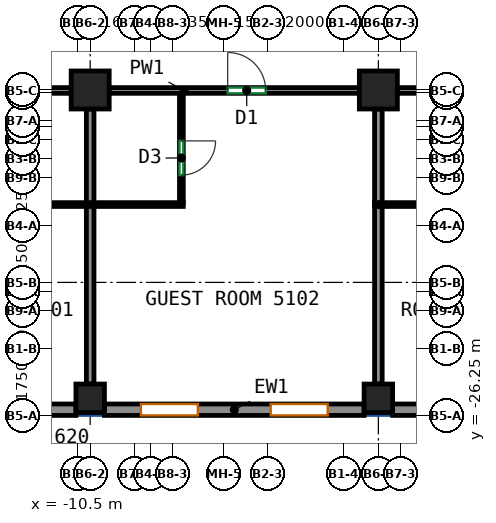
"""IFC4 building model, lengths in metres.
Left out: names, types, materials, properties, quantities, classifications, styles, units other than length and angle.
Written with IfcOpenShell. Run it as: python <this file> out.ifc"""

import sys

from ifc_helpers import new_model, si_unit, direction, frame, frame_2d, origin, origin_2d, place, context, subcontext, project, spatial, rectangle, extrude, source, transform, mapped, element, fill, save


model = new_model("IFC4")
c1 = context("Model", 3, precision=1e-05, world=origin(), true_north=direction((0.0, 1.0)))
c2 = subcontext(c1, "Body", "Model", "MODEL_VIEW")
j1 = project(units=[si_unit("LENGTHUNIT", "METRE"), si_unit("PLANEANGLEUNIT", "RADIAN")], contexts=[c1])
p1 = place(None, origin())
s1 = spatial("IfcSite", under=j1, at=p1, CompositionType="ELEMENT")
p2 = place(p1, origin())
s2 = spatial("IfcBuilding", under=s1, at=p2, CompositionType="ELEMENT")
p3 = place(p2, frame((0.0, 0.0, 210.1)))
s3 = spatial("IfcBuildingStorey", under=s2, at=p3, CompositionType="ELEMENT", Elevation=210.1)
m1 = source(origin(), c2, "Body", "SweptSolid", [
    extrude(rectangle(XDim=0.75, YDim=0.75, at=origin_2d()), origin(), (0.0, 0.0, 1.0), 3.12),
])
p4 = place(p3, frame((-10.167, -25.8, 0.0), z_axis=(0.0, 0.0, 1.0), x_axis=(1.0, 0.0, 0.0)))
e1 = element("IfcColumn", 1, at=p4, inside=s3, PredefinedType="COLUMN", context=c2, shape_type="MappedRepresentation", body=[
    mapped(m1, transform((0.0, 0.0, 0.0))),
])
m2 = source(origin(), c2, "Body", "SweptSolid", [
    extrude(rectangle(XDim=1.0, YDim=1.0, at=origin_2d()), origin(), (0.0, 0.0, 1.0), 3.12),
])
p5 = place(p3, frame((-10.167, -17.688, 0.0), z_axis=(0.0, 0.0, 1.0), x_axis=(1.0, 0.0, 0.0)))
e2 = element("IfcColumn", 2, at=p5, inside=s3, PredefinedType="COLUMN", context=c2, shape_type="MappedRepresentation", body=[
    mapped(m2, transform((0.0, 0.0, 0.0))),
])
p6 = place(p3, frame((-2.583, -25.8, 0.0), z_axis=(0.0, 0.0, 1.0), x_axis=(1.0, 0.0, 0.0)))
e3 = element("IfcColumn", 3, at=p6, inside=s3, PredefinedType="COLUMN", context=c2, shape_type="MappedRepresentation", body=[
    mapped(m1, transform((0.0, 0.0, 0.0))),
])
p7 = place(p3, frame((-2.583, -17.688, 0.0), z_axis=(0.0, 0.0, 1.0), x_axis=(1.0, 0.0, 0.0)))
e4 = element("IfcColumn", 4, at=p7, inside=s3, PredefinedType="COLUMN", context=c2, shape_type="MappedRepresentation", body=[
    mapped(m2, transform((0.0, 0.0, 0.0))),
])
m3 = source(origin(), c2, "Body", "SweptSolid", [
    extrude(rectangle(XDim=6.833, YDim=0.3, at=frame_2d((3.417, 0.0))), origin(), (0.0, 0.0, 1.0), 3.12),
])
p8 = place(p3, frame((-17.375, -26.1, 0.0), z_axis=(0.0, 0.0, 1.0), x_axis=(1.0, 0.0, 0.0)))
e5 = element("IfcWall", 5, at=p8, inside=s3, PredefinedType="SOLIDWALL", context=c2, shape_type="MappedRepresentation", body=[
    mapped(m3, transform((0.0, 0.0, 0.0))),
])
p9 = place(p8, frame((0.958, 0.0, 0.85)))
e6 = element("IfcOpeningElement", 6, at=p9, cuts=e5, PredefinedType="OPENING", context=c2, shape_type="SweptSolid", body=[
    extrude(rectangle(XDim=1.5, YDim=1.95, at=frame_2d((0.75, 0.975))), frame((0.0, 0.16, 0.0), z_axis=(0.0, -1.0, 0.0), x_axis=(1.0, 0.0, 0.0)), (0.0, 0.0, 1.0), 0.32),
])
p10 = place(p8, frame((4.375, 0.0, 0.85)))
e7 = element("IfcOpeningElement", 7, at=p10, cuts=e5, PredefinedType="OPENING", context=c2, shape_type="SweptSolid", body=[
    extrude(rectangle(XDim=1.5, YDim=1.95, at=frame_2d((0.75, 0.975))), frame((0.0, 0.16, 0.0), z_axis=(0.0, -1.0, 0.0), x_axis=(1.0, 0.0, 0.0)), (0.0, 0.0, 1.0), 0.32),
])
m4 = source(origin(), c2, "Body", "SweptSolid", [
    extrude(rectangle(XDim=6.833, YDim=0.3, at=frame_2d((3.417, 0.0))), origin(), (0.0, 0.0, 1.0), 3.12),
])
p11 = place(p3, frame((-9.792, -26.1, 0.0), z_axis=(0.0, 0.0, 1.0), x_axis=(1.0, 0.0, 0.0)))
e8 = element("IfcWall", 8, at=p11, inside=s3, PredefinedType="SOLIDWALL", context=c2, shape_type="MappedRepresentation", body=[
    mapped(m4, transform((0.0, 0.0, 0.0))),
])
p12 = place(p11, frame((0.958, 0.0, 0.85)))
e9 = element("IfcOpeningElement", 9, at=p12, cuts=e8, PredefinedType="OPENING", context=c2, shape_type="SweptSolid", body=[
    extrude(rectangle(XDim=1.5, YDim=1.95, at=frame_2d((0.75, 0.975))), frame((0.0, 0.16, 0.0), z_axis=(0.0, -1.0, 0.0), x_axis=(1.0, 0.0, 0.0)), (0.0, 0.0, 1.0), 0.32),
])
p13 = place(p11, frame((4.375, 0.0, 0.85)))
e10 = element("IfcOpeningElement", 10, at=p13, cuts=e8, PredefinedType="OPENING", context=c2, shape_type="SweptSolid", body=[
    extrude(rectangle(XDim=1.5, YDim=1.95, at=frame_2d((0.75, 0.975))), frame((0.0, 0.16, 0.0), z_axis=(0.0, -1.0, 0.0), x_axis=(1.0, 0.0, 0.0)), (0.0, 0.0, 1.0), 0.32),
])
p14 = place(p3, frame((-2.208, -26.1, 0.0), z_axis=(0.0, 0.0, 1.0), x_axis=(1.0, 0.0, 0.0)))
e11 = element("IfcWall", 11, at=p14, inside=s3, PredefinedType="SOLIDWALL", context=c2, shape_type="MappedRepresentation", body=[
    mapped(m3, transform((0.0, 0.0, 0.0))),
])
p15 = place(p14, frame((0.958, 0.0, 0.85)))
e12 = element("IfcOpeningElement", 12, at=p15, cuts=e11, PredefinedType="OPENING", context=c2, shape_type="SweptSolid", body=[
    extrude(rectangle(XDim=1.5, YDim=1.95, at=frame_2d((0.75, 0.975))), frame((0.0, 0.16, 0.0), z_axis=(0.0, -1.0, 0.0), x_axis=(1.0, 0.0, 0.0)), (0.0, 0.0, 1.0), 0.32),
])
p16 = place(p14, frame((4.375, 0.0, 0.85)))
e13 = element("IfcOpeningElement", 13, at=p16, cuts=e11, PredefinedType="OPENING", context=c2, shape_type="SweptSolid", body=[
    extrude(rectangle(XDim=1.5, YDim=1.95, at=frame_2d((0.75, 0.975))), frame((0.0, 0.16, 0.0), z_axis=(0.0, -1.0, 0.0), x_axis=(1.0, 0.0, 0.0)), (0.0, 0.0, 1.0), 0.32),
])
p17 = place(p3, frame((-18.9, -17.7, 0.0), z_axis=(0.0, 0.0, 1.0), x_axis=(1.0, 0.0, 0.0)))
e14 = element("IfcWall", 14, at=p17, inside=s3, PredefinedType="PARTITIONING", context=c2, shape_type="SweptSolid", body=[
    extrude(rectangle(XDim=8.233, YDim=0.15, at=frame_2d((4.116, 0.0))), origin(), (0.0, 0.0, 1.0), 2.52),
])
p18 = place(p17, frame((0.305, 0.0, 0.0)))
e15 = element("IfcOpeningElement", 15, at=p18, cuts=e14, PredefinedType="OPENING", context=c2, shape_type="SweptSolid", body=[
    extrude(rectangle(XDim=1.0, YDim=2.1, at=frame_2d((0.5, 1.05))), frame((0.0, 0.085, 0.0), z_axis=(0.0, -1.0, 0.0), x_axis=(1.0, 0.0, 0.0)), (0.0, 0.0, 1.0), 0.17),
])
p19 = place(p17, frame((5.143, 0.0, 0.0)))
e16 = element("IfcOpeningElement", 16, at=p19, cuts=e14, PredefinedType="OPENING", context=c2, shape_type="SweptSolid", body=[
    extrude(rectangle(XDim=1.0, YDim=2.1, at=frame_2d((0.5, 1.05))), frame((0.0, 0.085, 0.0), z_axis=(0.0, -1.0, 0.0), x_axis=(1.0, 0.0, 0.0)), (0.0, 0.0, 1.0), 0.17),
])
p20 = place(p3, frame((-9.667, -17.7, 0.0), z_axis=(0.0, 0.0, 1.0), x_axis=(1.0, 0.0, 0.0)))
e17 = element("IfcWall", 17, at=p20, inside=s3, PredefinedType="PARTITIONING", context=c2, shape_type="SweptSolid", body=[
    extrude(rectangle(XDim=6.584, YDim=0.15, at=frame_2d((3.292, 0.0))), origin(), (0.0, 0.0, 1.0), 3.12),
])
p21 = place(p20, frame((3.119, 0.0, 0.0)))
e18 = element("IfcOpeningElement", 18, at=p21, cuts=e17, PredefinedType="OPENING", context=c2, shape_type="SweptSolid", body=[
    extrude(rectangle(XDim=1.0, YDim=2.1, at=frame_2d((0.5, 1.05))), frame((0.0, 0.085, 0.0), z_axis=(0.0, -1.0, 0.0), x_axis=(1.0, 0.0, 0.0)), (0.0, 0.0, 1.0), 0.17),
])
p22 = place(p3, frame((-2.083, -17.7, 0.0), z_axis=(0.0, 0.0, 1.0), x_axis=(1.0, 0.0, 0.0)))
e19 = element("IfcWall", 19, at=p22, inside=s3, PredefinedType="PARTITIONING", context=c2, shape_type="SweptSolid", body=[
    extrude(rectangle(XDim=6.583, YDim=0.15, at=frame_2d((3.292, 0.0))), origin(), (0.0, 0.0, 1.0), 3.12),
])
p23 = place(p22, frame((2.171, 0.0, 0.0)))
e20 = element("IfcOpeningElement", 20, at=p23, cuts=e19, PredefinedType="OPENING", context=c2, shape_type="SweptSolid", body=[
    extrude(rectangle(XDim=1.0, YDim=2.1, at=frame_2d((0.5, 1.05))), frame((0.0, 0.085, 0.0), z_axis=(0.0, -1.0, 0.0), x_axis=(1.0, 0.0, 0.0)), (0.0, 0.0, 1.0), 0.17),
])
p24 = place(p22, frame((3.543, 0.0, 0.0)))
e21 = element("IfcOpeningElement", 21, at=p24, cuts=e19, PredefinedType="OPENING", context=c2, shape_type="SweptSolid", body=[
    extrude(rectangle(XDim=1.0, YDim=2.1, at=frame_2d((0.5, 1.05))), frame((0.0, 0.085, 0.0), z_axis=(0.0, -1.0, 0.0), x_axis=(1.0, 0.0, 0.0)), (0.0, 0.0, 1.0), 0.17),
])
p25 = place(p3, frame((-12.617, -20.702, 0.0), z_axis=(0.0, 0.0, 1.0), x_axis=(1.0, 0.0, 0.0)))
e22 = element("IfcWall", 22, at=p25, inside=s3, PredefinedType="PARTITIONING", context=c2, shape_type="SweptSolid", body=[
    extrude(rectangle(XDim=4.9, YDim=0.1, at=frame_2d((2.45, 0.0))), origin(), (0.0, 0.0, 1.0), 3.12),
])
p26 = place(p3, frame((-10.167, -25.425, 0.0), z_axis=(0.0, 0.0, 1.0), x_axis=(0.0, 1.0, 0.0)))
e23 = element("IfcWall", 23, at=p26, inside=s3, PredefinedType="PARTITIONING", context=c2, shape_type="SweptSolid", body=[
    extrude(rectangle(XDim=4.673, YDim=0.2, at=frame_2d((2.336, 0.0))), origin(), (0.0, 0.0, 1.0), 3.12),
])
p27 = place(p3, frame((-10.167, -20.652, 0.0), z_axis=(0.0, 0.0, 1.0), x_axis=(0.0, 1.0, 0.0)))
e24 = element("IfcWall", 24, at=p27, inside=s3, PredefinedType="PARTITIONING", context=c2, shape_type="SweptSolid", body=[
    extrude(rectangle(XDim=2.464, YDim=0.2, at=frame_2d((1.232, 0.0))), origin(), (0.0, 0.0, 1.0), 3.12),
])
p28 = place(p3, frame((-7.767, -17.777, 0.0), z_axis=(0.0, 0.0, 1.0), x_axis=(0.0, -1.0, 0.0)))
e25 = element("IfcWall", 25, at=p28, inside=s3, PredefinedType="PARTITIONING", context=c2, shape_type="SweptSolid", body=[
    extrude(rectangle(XDim=2.875, YDim=0.1, at=frame_2d((1.438, 0.0))), origin(), (0.0, 0.0, 1.0), 3.12),
])
p29 = place(p28, frame((1.25, 0.0, 0.0)))
e26 = element("IfcOpeningElement", 26, at=p29, cuts=e25, PredefinedType="OPENING", context=c2, shape_type="SweptSolid", body=[
    extrude(rectangle(XDim=0.9, YDim=2.1, at=frame_2d((0.45, 1.05))), frame((0.0, 0.06, 0.0), z_axis=(0.0, -1.0, 0.0), x_axis=(1.0, 0.0, 0.0)), (0.0, 0.0, 1.0), 0.12),
])
p30 = place(p3, frame((-2.583, -25.425, 0.0), z_axis=(0.0, 0.0, 1.0), x_axis=(0.0, 1.0, 0.0)))
e27 = element("IfcWall", 27, at=p30, inside=s3, PredefinedType="PARTITIONING", context=c2, shape_type="SweptSolid", body=[
    extrude(rectangle(XDim=4.683, YDim=0.2, at=frame_2d((2.342, 0.0))), origin(), (0.0, 0.0, 1.0), 3.12),
])
p31 = place(p3, frame((-2.583, -20.662, 0.0), z_axis=(0.0, 0.0, 1.0), x_axis=(0.0, 1.0, 0.0)))
e28 = element("IfcWall", 28, at=p31, inside=s3, PredefinedType="PARTITIONING", context=c2, shape_type="SweptSolid", body=[
    extrude(rectangle(XDim=2.474, YDim=0.2, at=frame_2d((1.237, 0.0))), origin(), (0.0, 0.0, 1.0), 3.12),
])
p32 = place(p3, frame((-2.683, -20.702, 0.0), z_axis=(0.0, 0.0, 1.0), x_axis=(1.0, 0.0, 0.0)))
e29 = element("IfcWall", 29, at=p32, inside=s3, PredefinedType="PARTITIONING", context=c2, shape_type="SweptSolid", body=[
    extrude(rectangle(XDim=2.55, YDim=0.1, at=frame_2d((1.275, 0.0))), origin(), (0.0, 0.0, 1.0), 3.12),
])
p33 = place(p12, origin())
e30 = element("IfcWindow", 30, at=p33, inside=s3, PartitioningType="SINGLE_PANEL", PredefinedType="WINDOW", context=c2, shape_type="SweptSolid", body=[
    extrude(rectangle(XDim=1.5, YDim=1.95, at=frame_2d((0.75, 0.975))), frame((0.0, 0.03, 0.0), z_axis=(0.0, -1.0, 0.0), x_axis=(1.0, 0.0, 0.0)), (0.0, 0.0, 1.0), 0.06),
])
fill(e9, e30)
p34 = place(p13, origin())
e31 = element("IfcWindow", 31, at=p34, inside=s3, PartitioningType="SINGLE_PANEL", PredefinedType="WINDOW", context=c2, shape_type="SweptSolid", body=[
    extrude(rectangle(XDim=1.5, YDim=1.95, at=frame_2d((0.75, 0.975))), frame((0.0, 0.03, 0.0), z_axis=(0.0, -1.0, 0.0), x_axis=(1.0, 0.0, 0.0)), (0.0, 0.0, 1.0), 0.06),
])
fill(e10, e31)
p35 = place(p29, origin())
e32 = element("IfcDoor", 32, at=p35, inside=s3, OperationType="SINGLE_SWING_LEFT", PredefinedType="DOOR", context=c2, shape_type="SweptSolid", body=[
    extrude(rectangle(XDim=0.9, YDim=2.1, at=frame_2d((0.45, 1.05))), frame((0.0, 0.025, 0.0), z_axis=(0.0, -1.0, 0.0), x_axis=(1.0, 0.0, 0.0)), (0.0, 0.0, 1.0), 0.05),
])
fill(e26, e32)
p36 = place(p21, origin())
e33 = element("IfcDoor", 33, at=p36, inside=s3, OperationType="SINGLE_SWING_LEFT", PredefinedType="DOOR", context=c2, shape_type="SweptSolid", body=[
    extrude(rectangle(XDim=1.0, YDim=2.1, at=frame_2d((0.5, 1.05))), frame((0.0, 0.025, 0.0), z_axis=(0.0, -1.0, 0.0), x_axis=(1.0, 0.0, 0.0)), (0.0, 0.0, 1.0), 0.05),
])
fill(e18, e33)
save(model, sys.argv[1])
